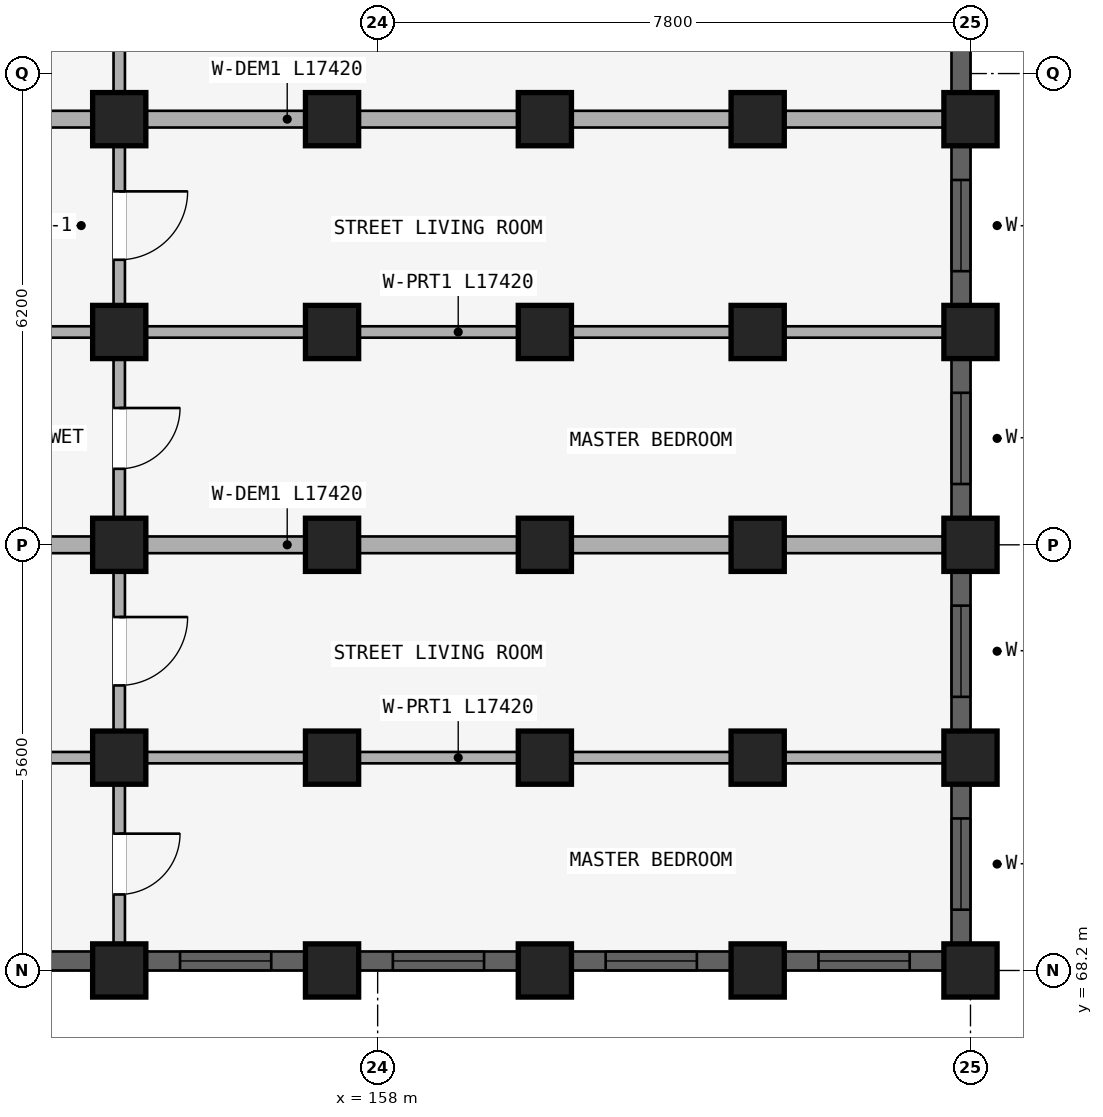
"""IFC4 building model, lengths in metres.
Left out: names, types, materials, properties, quantities, classifications, styles, units other than length and angle.
Written with IfcOpenShell. Run it as: python <this file> out.ifc"""

import sys

from ifc_helpers import new_model, si_unit, direction, frame, frame_2d, origin, origin_2d, place, context, subcontext, project, spatial, rectangle, extrude, element, fill, save


model = new_model("IFC4")
c1 = context("Model", 3, precision=1e-05, world=origin(), true_north=direction((0.0, 1.0)))
c2 = subcontext(c1, "Body", "Model", "MODEL_VIEW")
j1 = project(units=[si_unit("LENGTHUNIT", "METRE"), si_unit("PLANEANGLEUNIT", "RADIAN")], contexts=[c1])
p1 = place(None, origin())
s1 = spatial("IfcSite", under=j1, at=p1, CompositionType="ELEMENT")
p2 = place(p1, origin())
s2 = spatial("IfcBuilding", under=s1, at=p2, CompositionType="ELEMENT")
p3 = place(p2, frame((0.0, 0.0, 18.15)))
s3 = spatial("IfcBuildingStorey", under=s2, at=p3, CompositionType="ELEMENT", Elevation=18.15)
for number, where, z_axis, x_axis in (
    (1, (154.6, 79.4, 0.0), (0.0, 0.0, 1.0), (1.0, 0.0, 0.0)),
    (2, (157.4, 79.4, 0.0), (0.0, 0.0, 1.0), (1.0, 0.0, 0.0)),
    (3, (160.2, 79.4, 0.0), (0.0, 0.0, 1.0), (1.0, 0.0, 0.0)),
    (4, (163.0, 79.4, 0.0), (0.0, 0.0, 1.0), (1.0, 0.0, 0.0)),
    (5, (165.8, 79.4, 0.0), (0.0, 0.0, 1.0), (1.0, 0.0, 0.0)),
    (6, (154.6, 76.6, 0.0), (0.0, 0.0, 1.0), (1.0, 0.0, 0.0)),
    (7, (157.4, 76.6, 0.0), (0.0, 0.0, 1.0), (1.0, 0.0, 0.0)),
    (8, (160.2, 76.6, 0.0), (0.0, 0.0, 1.0), (1.0, 0.0, 0.0)),
    (9, (163.0, 76.6, 0.0), (0.0, 0.0, 1.0), (1.0, 0.0, 0.0)),
    (10, (165.8, 76.6, 0.0), (0.0, 0.0, 1.0), (1.0, 0.0, 0.0)),
    (11, (154.6, 73.8, 0.0), (0.0, 0.0, 1.0), (1.0, 0.0, 0.0)),
    (12, (157.4, 73.8, 0.0), (0.0, 0.0, 1.0), (1.0, 0.0, 0.0)),
    (13, (160.2, 73.8, 0.0), (0.0, 0.0, 1.0), (1.0, 0.0, 0.0)),
    (14, (163.0, 73.8, 0.0), (0.0, 0.0, 1.0), (1.0, 0.0, 0.0)),
    (15, (165.8, 73.8, 0.0), (0.0, 0.0, 1.0), (1.0, 0.0, 0.0)),
    (16, (154.6, 71.0, 0.0), (0.0, 0.0, 1.0), (1.0, 0.0, 0.0)),
    (17, (157.4, 71.0, 0.0), (0.0, 0.0, 1.0), (1.0, 0.0, 0.0)),
    (18, (160.2, 71.0, 0.0), (0.0, 0.0, 1.0), (1.0, 0.0, 0.0)),
    (19, (163.0, 71.0, 0.0), (0.0, 0.0, 1.0), (1.0, 0.0, 0.0)),
    (20, (165.8, 71.0, 0.0), (0.0, 0.0, 1.0), (1.0, 0.0, 0.0)),
    (21, (154.6, 68.2, 0.0), (0.0, 0.0, 1.0), (1.0, 0.0, 0.0)),
    (22, (157.4, 68.2, 0.0), (0.0, 0.0, 1.0), (1.0, 0.0, 0.0)),
    (23, (160.2, 68.2, 0.0), (0.0, 0.0, 1.0), (1.0, 0.0, 0.0)),
    (24, (163.0, 68.2, 0.0), (0.0, 0.0, 1.0), (1.0, 0.0, 0.0)),
    (25, (165.8, 68.2, 0.0), (0.0, 0.0, 1.0), (1.0, 0.0, 0.0)),
):
    element("IfcColumn", number, at=place(p3, frame(where, z_axis=z_axis, x_axis=x_axis)), inside=s3, PredefinedType="COLUMN", context=c2, shape_type="SweptSolid", body=[
        extrude(rectangle(XDim=0.7, YDim=0.7, at=origin_2d()), origin(), (0.0, 0.0, 1.0), 2.93),
    ])
p4 = place(p3, frame((154.6, 83.52, 0.0), z_axis=(0.0, 0.0, 1.0), x_axis=(0.0, -1.0, 0.0)))
e26 = element("IfcWall", 26, at=p4, inside=s3, PredefinedType="PARTITIONING", context=c2, shape_type="SweptSolid", body=[
    extrude(rectangle(XDim=4.04, YDim=0.15, at=frame_2d((2.02, 0.0))), origin(), (0.0, 0.0, 1.0), 2.372),
])
p5 = place(p4, frame((1.57, 0.0, 0.0)))
e27 = element("IfcOpeningElement", 27, at=p5, cuts=e26, PredefinedType="OPENING", context=c2, shape_type="SweptSolid", body=[
    extrude(rectangle(XDim=0.9, YDim=2.1, at=frame_2d((0.45, 1.05))), frame((0.0, 0.085, 0.0), z_axis=(0.0, -1.0, 0.0), x_axis=(1.0, 0.0, 0.0)), (0.0, 0.0, 1.0), 0.17),
])
p6 = place(p3, frame((154.6, 79.32, 0.0), z_axis=(0.0, 0.0, 1.0), x_axis=(0.0, -1.0, 0.0)))
e28 = element("IfcWall", 28, at=p6, inside=s3, PredefinedType="PLUMBINGWALL", context=c2, shape_type="SweptSolid", body=[
    extrude(rectangle(XDim=2.64, YDim=0.15, at=frame_2d((1.32, 0.0))), origin(), (0.0, 0.0, 1.0), 2.372),
])
p7 = place(p6, frame((0.87, 0.0, 0.0)))
e29 = element("IfcOpeningElement", 29, at=p7, cuts=e28, PredefinedType="OPENING", context=c2, shape_type="SweptSolid", body=[
    extrude(rectangle(XDim=0.9, YDim=2.1, at=frame_2d((0.45, 1.05))), frame((0.0, 0.085, 0.0), z_axis=(0.0, -1.0, 0.0), x_axis=(1.0, 0.0, 0.0)), (0.0, 0.0, 1.0), 0.17),
])
p8 = place(p3, frame((148.1, 79.4, 0.0), z_axis=(0.0, 0.0, 1.0), x_axis=(1.0, 0.0, 0.0)))
e30 = element("IfcWall", 30, at=p8, inside=s3, PredefinedType="STANDARD", context=c2, shape_type="SweptSolid", body=[
    extrude(rectangle(XDim=17.42, YDim=0.22, at=frame_2d((8.71, 0.0))), origin(), (0.0, 0.0, 1.0), 2.372),
])
p9 = place(p3, frame((154.6, 76.52, 0.0), z_axis=(0.0, 0.0, 1.0), x_axis=(0.0, -1.0, 0.0)))
e31 = element("IfcWall", 31, at=p9, inside=s3, PredefinedType="PLUMBINGWALL", context=c2, shape_type="SweptSolid", body=[
    extrude(rectangle(XDim=2.64, YDim=0.15, at=frame_2d((1.32, 0.0))), origin(), (0.0, 0.0, 1.0), 2.372),
])
p10 = place(p9, frame((0.92, 0.0, 0.0)))
e32 = element("IfcOpeningElement", 32, at=p10, cuts=e31, PredefinedType="OPENING", context=c2, shape_type="SweptSolid", body=[
    extrude(rectangle(XDim=0.8, YDim=2.1, at=frame_2d((0.4, 1.05))), frame((0.0, 0.085, 0.0), z_axis=(0.0, -1.0, 0.0), x_axis=(1.0, 0.0, 0.0)), (0.0, 0.0, 1.0), 0.17),
])
p11 = place(p3, frame((148.1, 76.6, 0.0), z_axis=(0.0, 0.0, 1.0), x_axis=(1.0, 0.0, 0.0)))
e33 = element("IfcWall", 33, at=p11, inside=s3, PredefinedType="PARTITIONING", context=c2, shape_type="SweptSolid", body=[
    extrude(rectangle(XDim=17.42, YDim=0.15, at=frame_2d((8.71, 0.0))), origin(), (0.0, 0.0, 1.0), 2.372),
])
p12 = place(p11, frame((2.75, 0.0, 0.0)))
e34 = element("IfcOpeningElement", 34, at=p12, cuts=e33, PredefinedType="OPENING", context=c2, shape_type="SweptSolid", body=[
    extrude(rectangle(XDim=0.9, YDim=2.1, at=frame_2d((0.45, 1.05))), frame((0.0, 0.085, 0.0), z_axis=(0.0, -1.0, 0.0), x_axis=(1.0, 0.0, 0.0)), (0.0, 0.0, 1.0), 0.17),
])
p13 = place(p3, frame((154.6, 73.72, 0.0), z_axis=(0.0, 0.0, 1.0), x_axis=(0.0, -1.0, 0.0)))
e35 = element("IfcWall", 35, at=p13, inside=s3, PredefinedType="PLUMBINGWALL", context=c2, shape_type="SweptSolid", body=[
    extrude(rectangle(XDim=2.64, YDim=0.15, at=frame_2d((1.32, 0.0))), origin(), (0.0, 0.0, 1.0), 2.372),
])
p14 = place(p13, frame((0.87, 0.0, 0.0)))
e36 = element("IfcOpeningElement", 36, at=p14, cuts=e35, PredefinedType="OPENING", context=c2, shape_type="SweptSolid", body=[
    extrude(rectangle(XDim=0.9, YDim=2.1, at=frame_2d((0.45, 1.05))), frame((0.0, 0.085, 0.0), z_axis=(0.0, -1.0, 0.0), x_axis=(1.0, 0.0, 0.0)), (0.0, 0.0, 1.0), 0.17),
])
p15 = place(p3, frame((148.1, 73.8, 0.0), z_axis=(0.0, 0.0, 1.0), x_axis=(1.0, 0.0, 0.0)))
e37 = element("IfcWall", 37, at=p15, inside=s3, PredefinedType="STANDARD", context=c2, shape_type="SweptSolid", body=[
    extrude(rectangle(XDim=17.42, YDim=0.22, at=frame_2d((8.71, 0.0))), origin(), (0.0, 0.0, 1.0), 2.372),
])
p16 = place(p3, frame((154.6, 70.92, 0.0), z_axis=(0.0, 0.0, 1.0), x_axis=(0.0, -1.0, 0.0)))
e38 = element("IfcWall", 38, at=p16, inside=s3, PredefinedType="PLUMBINGWALL", context=c2, shape_type="SweptSolid", body=[
    extrude(rectangle(XDim=2.64, YDim=0.15, at=frame_2d((1.32, 0.0))), origin(), (0.0, 0.0, 1.0), 2.372),
])
p17 = place(p16, frame((0.92, 0.0, 0.0)))
e39 = element("IfcOpeningElement", 39, at=p17, cuts=e38, PredefinedType="OPENING", context=c2, shape_type="SweptSolid", body=[
    extrude(rectangle(XDim=0.8, YDim=2.1, at=frame_2d((0.4, 1.05))), frame((0.0, 0.085, 0.0), z_axis=(0.0, -1.0, 0.0), x_axis=(1.0, 0.0, 0.0)), (0.0, 0.0, 1.0), 0.17),
])
p18 = place(p3, frame((148.1, 71.0, 0.0), z_axis=(0.0, 0.0, 1.0), x_axis=(1.0, 0.0, 0.0)))
e40 = element("IfcWall", 40, at=p18, inside=s3, PredefinedType="PARTITIONING", context=c2, shape_type="SweptSolid", body=[
    extrude(rectangle(XDim=17.42, YDim=0.15, at=frame_2d((8.71, 0.0))), origin(), (0.0, 0.0, 1.0), 2.372),
])
p19 = place(p18, frame((2.75, 0.0, 0.0)))
e41 = element("IfcOpeningElement", 41, at=p19, cuts=e40, PredefinedType="OPENING", context=c2, shape_type="SweptSolid", body=[
    extrude(rectangle(XDim=0.9, YDim=2.1, at=frame_2d((0.45, 1.05))), frame((0.0, 0.085, 0.0), z_axis=(0.0, -1.0, 0.0), x_axis=(1.0, 0.0, 0.0)), (0.0, 0.0, 1.0), 0.17),
])
p20 = place(p3, frame((165.675, 83.247, 0.0), z_axis=(0.0, 0.0, 1.0), x_axis=(0.0, -1.0, 0.0)))
e42 = element("IfcWall", 42, at=p20, inside=s3, PredefinedType="STANDARD", context=c2, shape_type="SweptSolid", body=[
    extrude(rectangle(XDim=3.493, YDim=0.25, at=frame_2d((1.747, 0.0))), origin(), (0.0, 0.0, 1.0), 2.472),
])
p21 = place(p20, frame((1.096, 0.0, 0.88)))
e43 = element("IfcOpeningElement", 43, at=p21, cuts=e42, PredefinedType="OPENING", context=c2, shape_type="SweptSolid", body=[
    extrude(rectangle(XDim=1.3, YDim=1.4, at=frame_2d((0.65, 0.7))), frame((0.0, 0.135, 0.0), z_axis=(0.0, -1.0, 0.0), x_axis=(1.0, 0.0, 0.0)), (0.0, 0.0, 1.0), 0.27),
])
p22 = place(p3, frame((165.675, 79.046, 0.0), z_axis=(0.0, 0.0, 1.0), x_axis=(0.0, -1.0, 0.0)))
e44 = element("IfcWall", 44, at=p22, inside=s3, PredefinedType="STANDARD", context=c2, shape_type="SweptSolid", body=[
    extrude(rectangle(XDim=2.093, YDim=0.25, at=frame_2d((1.046, 0.0))), origin(), (0.0, 0.0, 1.0), 2.472),
])
p23 = place(p22, frame((0.447, 0.0, 0.772)))
e45 = element("IfcOpeningElement", 45, at=p23, cuts=e44, PredefinedType="OPENING", context=c2, shape_type="SweptSolid", body=[
    extrude(rectangle(XDim=1.2, YDim=1.5, at=frame_2d((0.6, 0.75))), frame((0.0, 0.135, 0.0), z_axis=(0.0, -1.0, 0.0), x_axis=(1.0, 0.0, 0.0)), (0.0, 0.0, 1.0), 0.27),
])
p24 = place(p3, frame((165.675, 76.247, 0.0), z_axis=(0.0, 0.0, 1.0), x_axis=(0.0, -1.0, 0.0)))
e46 = element("IfcWall", 46, at=p24, inside=s3, PredefinedType="STANDARD", context=c2, shape_type="SweptSolid", body=[
    extrude(rectangle(XDim=2.093, YDim=0.25, at=frame_2d((1.046, 0.0))), origin(), (0.0, 0.0, 1.0), 2.472),
])
p25 = place(p24, frame((0.447, 0.0, 0.772)))
e47 = element("IfcOpeningElement", 47, at=p25, cuts=e46, PredefinedType="OPENING", context=c2, shape_type="SweptSolid", body=[
    extrude(rectangle(XDim=1.2, YDim=1.5, at=frame_2d((0.6, 0.75))), frame((0.0, 0.135, 0.0), z_axis=(0.0, -1.0, 0.0), x_axis=(1.0, 0.0, 0.0)), (0.0, 0.0, 1.0), 0.27),
])
p26 = place(p3, frame((165.675, 73.447, 0.0), z_axis=(0.0, 0.0, 1.0), x_axis=(0.0, -1.0, 0.0)))
e48 = element("IfcWall", 48, at=p26, inside=s3, PredefinedType="STANDARD", context=c2, shape_type="SweptSolid", body=[
    extrude(rectangle(XDim=2.093, YDim=0.25, at=frame_2d((1.046, 0.0))), origin(), (0.0, 0.0, 1.0), 2.472),
])
p27 = place(p26, frame((0.447, 0.0, 0.772)))
e49 = element("IfcOpeningElement", 49, at=p27, cuts=e48, PredefinedType="OPENING", context=c2, shape_type="SweptSolid", body=[
    extrude(rectangle(XDim=1.2, YDim=1.5, at=frame_2d((0.6, 0.75))), frame((0.0, 0.135, 0.0), z_axis=(0.0, -1.0, 0.0), x_axis=(1.0, 0.0, 0.0)), (0.0, 0.0, 1.0), 0.27),
])
p28 = place(p3, frame((165.675, 70.646, 0.0), z_axis=(0.0, 0.0, 1.0), x_axis=(0.0, -1.0, 0.0)))
e50 = element("IfcWall", 50, at=p28, inside=s3, PredefinedType="STANDARD", context=c2, shape_type="SweptSolid", body=[
    extrude(rectangle(XDim=2.093, YDim=0.25, at=frame_2d((1.046, 0.0))), origin(), (0.0, 0.0, 1.0), 2.472),
])
p29 = place(p28, frame((0.447, 0.0, 0.772)))
e51 = element("IfcOpeningElement", 51, at=p29, cuts=e50, PredefinedType="OPENING", context=c2, shape_type="SweptSolid", body=[
    extrude(rectangle(XDim=1.2, YDim=1.5, at=frame_2d((0.6, 0.75))), frame((0.0, 0.135, 0.0), z_axis=(0.0, -1.0, 0.0), x_axis=(1.0, 0.0, 0.0)), (0.0, 0.0, 1.0), 0.27),
])
p30 = place(p3, frame((148.229, 68.325, 0.0), z_axis=(0.0, 0.0, 1.0), x_axis=(1.0, 0.0, 0.0)))
e52 = element("IfcWall", 52, at=p30, inside=s3, PredefinedType="STANDARD", context=c2, shape_type="SweptSolid", body=[
    extrude(rectangle(XDim=6.018, YDim=0.25, at=frame_2d((3.009, 0.0))), origin(), (0.0, 0.0, 1.0), 2.372),
])
p31 = place(p30, frame((2.322, 0.0, 0.522)))
e53 = element("IfcOpeningElement", 53, at=p31, cuts=e52, PredefinedType="OPENING", context=c2, shape_type="SweptSolid", body=[
    extrude(rectangle(XDim=1.5, YDim=1.65, at=frame_2d((0.75, 0.825))), frame((0.0, 0.135, 0.0), z_axis=(0.0, -1.0, 0.0), x_axis=(1.0, 0.0, 0.0)), (0.0, 0.0, 1.0), 0.27),
])
p32 = place(p3, frame((154.954, 68.325, 0.0), z_axis=(0.0, 0.0, 1.0), x_axis=(1.0, 0.0, 0.0)))
e54 = element("IfcWall", 54, at=p32, inside=s3, PredefinedType="STANDARD", context=c2, shape_type="SweptSolid", body=[
    extrude(rectangle(XDim=2.093, YDim=0.25, at=frame_2d((1.046, 0.0))), origin(), (0.0, 0.0, 1.0), 2.372),
])
p33 = place(p32, frame((0.447, 0.0, 0.672)))
e55 = element("IfcOpeningElement", 55, at=p33, cuts=e54, PredefinedType="OPENING", context=c2, shape_type="SweptSolid", body=[
    extrude(rectangle(XDim=1.2, YDim=1.5, at=frame_2d((0.6, 0.75))), frame((0.0, 0.135, 0.0), z_axis=(0.0, -1.0, 0.0), x_axis=(1.0, 0.0, 0.0)), (0.0, 0.0, 1.0), 0.27),
])
p34 = place(p3, frame((157.753, 68.325, 0.0), z_axis=(0.0, 0.0, 1.0), x_axis=(1.0, 0.0, 0.0)))
e56 = element("IfcWall", 56, at=p34, inside=s3, PredefinedType="STANDARD", context=c2, shape_type="SweptSolid", body=[
    extrude(rectangle(XDim=2.093, YDim=0.25, at=frame_2d((1.046, 0.0))), origin(), (0.0, 0.0, 1.0), 2.372),
])
p35 = place(p34, frame((0.447, 0.0, 0.672)))
e57 = element("IfcOpeningElement", 57, at=p35, cuts=e56, PredefinedType="OPENING", context=c2, shape_type="SweptSolid", body=[
    extrude(rectangle(XDim=1.2, YDim=1.5, at=frame_2d((0.6, 0.75))), frame((0.0, 0.135, 0.0), z_axis=(0.0, -1.0, 0.0), x_axis=(1.0, 0.0, 0.0)), (0.0, 0.0, 1.0), 0.27),
])
p36 = place(p3, frame((160.553, 68.325, 0.0), z_axis=(0.0, 0.0, 1.0), x_axis=(1.0, 0.0, 0.0)))
e58 = element("IfcWall", 58, at=p36, inside=s3, PredefinedType="STANDARD", context=c2, shape_type="SweptSolid", body=[
    extrude(rectangle(XDim=2.093, YDim=0.25, at=frame_2d((1.046, 0.0))), origin(), (0.0, 0.0, 1.0), 2.372),
])
p37 = place(p36, frame((0.447, 0.0, 0.672)))
e59 = element("IfcOpeningElement", 59, at=p37, cuts=e58, PredefinedType="OPENING", context=c2, shape_type="SweptSolid", body=[
    extrude(rectangle(XDim=1.2, YDim=1.5, at=frame_2d((0.6, 0.75))), frame((0.0, 0.135, 0.0), z_axis=(0.0, -1.0, 0.0), x_axis=(1.0, 0.0, 0.0)), (0.0, 0.0, 1.0), 0.27),
])
p38 = place(p3, frame((163.354, 68.325, 0.0), z_axis=(0.0, 0.0, 1.0), x_axis=(1.0, 0.0, 0.0)))
e60 = element("IfcWall", 60, at=p38, inside=s3, PredefinedType="STANDARD", context=c2, shape_type="SweptSolid", body=[
    extrude(rectangle(XDim=2.093, YDim=0.25, at=frame_2d((1.046, 0.0))), origin(), (0.0, 0.0, 1.0), 2.372),
])
p39 = place(p38, frame((0.447, 0.0, 0.672)))
e61 = element("IfcOpeningElement", 61, at=p39, cuts=e60, PredefinedType="OPENING", context=c2, shape_type="SweptSolid", body=[
    extrude(rectangle(XDim=1.2, YDim=1.5, at=frame_2d((0.6, 0.75))), frame((0.0, 0.135, 0.0), z_axis=(0.0, -1.0, 0.0), x_axis=(1.0, 0.0, 0.0)), (0.0, 0.0, 1.0), 0.27),
])
p40 = place(p23, origin())
e62 = element("IfcWindow", 62, at=p40, inside=s3, PartitioningType="SINGLE_PANEL", PredefinedType="WINDOW", context=c2, shape_type="SweptSolid", body=[
    extrude(rectangle(XDim=1.2, YDim=1.5, at=frame_2d((0.6, 0.75))), frame((0.0, 0.03, 0.0), z_axis=(0.0, -1.0, 0.0), x_axis=(1.0, 0.0, 0.0)), (0.0, 0.0, 1.0), 0.06),
])
fill(e45, e62)
p41 = place(p25, origin())
e63 = element("IfcWindow", 63, at=p41, inside=s3, PartitioningType="SINGLE_PANEL", PredefinedType="WINDOW", context=c2, shape_type="SweptSolid", body=[
    extrude(rectangle(XDim=1.2, YDim=1.5, at=frame_2d((0.6, 0.75))), frame((0.0, 0.03, 0.0), z_axis=(0.0, -1.0, 0.0), x_axis=(1.0, 0.0, 0.0)), (0.0, 0.0, 1.0), 0.06),
])
fill(e47, e63)
p42 = place(p27, origin())
e64 = element("IfcWindow", 64, at=p42, inside=s3, PartitioningType="SINGLE_PANEL", PredefinedType="WINDOW", context=c2, shape_type="SweptSolid", body=[
    extrude(rectangle(XDim=1.2, YDim=1.5, at=frame_2d((0.6, 0.75))), frame((0.0, 0.03, 0.0), z_axis=(0.0, -1.0, 0.0), x_axis=(1.0, 0.0, 0.0)), (0.0, 0.0, 1.0), 0.06),
])
fill(e49, e64)
p43 = place(p29, origin())
e65 = element("IfcWindow", 65, at=p43, inside=s3, PartitioningType="SINGLE_PANEL", PredefinedType="WINDOW", context=c2, shape_type="SweptSolid", body=[
    extrude(rectangle(XDim=1.2, YDim=1.5, at=frame_2d((0.6, 0.75))), frame((0.0, 0.03, 0.0), z_axis=(0.0, -1.0, 0.0), x_axis=(1.0, 0.0, 0.0)), (0.0, 0.0, 1.0), 0.06),
])
fill(e51, e65)
p44 = place(p33, origin())
e66 = element("IfcWindow", 66, at=p44, inside=s3, PartitioningType="SINGLE_PANEL", PredefinedType="WINDOW", context=c2, shape_type="SweptSolid", body=[
    extrude(rectangle(XDim=1.2, YDim=1.5, at=frame_2d((0.6, 0.75))), frame((0.0, 0.03, 0.0), z_axis=(0.0, -1.0, 0.0), x_axis=(1.0, 0.0, 0.0)), (0.0, 0.0, 1.0), 0.06),
])
fill(e55, e66)
p45 = place(p35, origin())
e67 = element("IfcWindow", 67, at=p45, inside=s3, PartitioningType="SINGLE_PANEL", PredefinedType="WINDOW", context=c2, shape_type="SweptSolid", body=[
    extrude(rectangle(XDim=1.2, YDim=1.5, at=frame_2d((0.6, 0.75))), frame((0.0, 0.03, 0.0), z_axis=(0.0, -1.0, 0.0), x_axis=(1.0, 0.0, 0.0)), (0.0, 0.0, 1.0), 0.06),
])
fill(e57, e67)
p46 = place(p37, origin())
e68 = element("IfcWindow", 68, at=p46, inside=s3, PartitioningType="SINGLE_PANEL", PredefinedType="WINDOW", context=c2, shape_type="SweptSolid", body=[
    extrude(rectangle(XDim=1.2, YDim=1.5, at=frame_2d((0.6, 0.75))), frame((0.0, 0.03, 0.0), z_axis=(0.0, -1.0, 0.0), x_axis=(1.0, 0.0, 0.0)), (0.0, 0.0, 1.0), 0.06),
])
fill(e59, e68)
p47 = place(p39, origin())
e69 = element("IfcWindow", 69, at=p47, inside=s3, PartitioningType="SINGLE_PANEL", PredefinedType="WINDOW", context=c2, shape_type="SweptSolid", body=[
    extrude(rectangle(XDim=1.2, YDim=1.5, at=frame_2d((0.6, 0.75))), frame((0.0, 0.03, 0.0), z_axis=(0.0, -1.0, 0.0), x_axis=(1.0, 0.0, 0.0)), (0.0, 0.0, 1.0), 0.06),
])
fill(e61, e69)
p48 = place(p7, origin())
e70 = element("IfcDoor", 70, at=p48, inside=s3, OperationType="SINGLE_SWING_LEFT", PredefinedType="DOOR", context=c2, shape_type="SweptSolid", body=[
    extrude(rectangle(XDim=0.9, YDim=2.1, at=frame_2d((0.45, 1.05))), frame((0.0, 0.025, 0.0), z_axis=(0.0, -1.0, 0.0), x_axis=(1.0, 0.0, 0.0)), (0.0, 0.0, 1.0), 0.05),
])
fill(e29, e70)
p49 = place(p10, origin())
e71 = element("IfcDoor", 71, at=p49, inside=s3, OperationType="SINGLE_SWING_LEFT", PredefinedType="DOOR", context=c2, shape_type="SweptSolid", body=[
    extrude(rectangle(XDim=0.8, YDim=2.1, at=frame_2d((0.4, 1.05))), frame((0.0, 0.025, 0.0), z_axis=(0.0, -1.0, 0.0), x_axis=(1.0, 0.0, 0.0)), (0.0, 0.0, 1.0), 0.05),
])
fill(e32, e71)
p50 = place(p14, origin())
e72 = element("IfcDoor", 72, at=p50, inside=s3, OperationType="SINGLE_SWING_LEFT", PredefinedType="DOOR", context=c2, shape_type="SweptSolid", body=[
    extrude(rectangle(XDim=0.9, YDim=2.1, at=frame_2d((0.45, 1.05))), frame((0.0, 0.025, 0.0), z_axis=(0.0, -1.0, 0.0), x_axis=(1.0, 0.0, 0.0)), (0.0, 0.0, 1.0), 0.05),
])
fill(e36, e72)
p51 = place(p17, origin())
e73 = element("IfcDoor", 73, at=p51, inside=s3, OperationType="SINGLE_SWING_LEFT", PredefinedType="DOOR", context=c2, shape_type="SweptSolid", body=[
    extrude(rectangle(XDim=0.8, YDim=2.1, at=frame_2d((0.4, 1.05))), frame((0.0, 0.025, 0.0), z_axis=(0.0, -1.0, 0.0), x_axis=(1.0, 0.0, 0.0)), (0.0, 0.0, 1.0), 0.05),
])
fill(e39, e73)
save(model, sys.argv[1])
